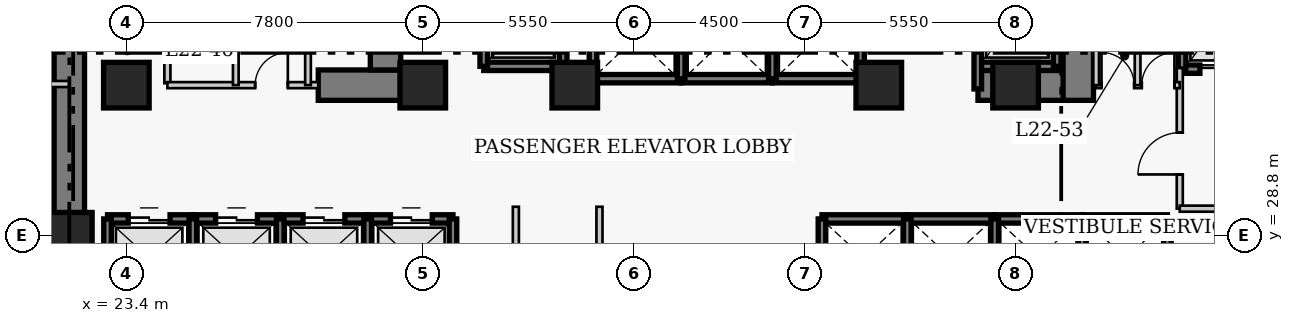
"""IFC4 building model, lengths in metres.
Left out: names, types, materials, properties, quantities, classifications, styles, units other than length and angle.
Written with IfcOpenShell. Run it as: python <this file> out.ifc"""

import sys

from ifc_helpers import new_model, si_unit, direction, frame, frame_2d, origin, origin_2d, place, context, subcontext, project, spatial, rectangle, extrude, element, fill, save


model = new_model("IFC4")
c1 = context("Model", 3, precision=1e-05, world=origin(), true_north=direction((0.0, 1.0)))
c2 = subcontext(c1, "Body", "Model", "MODEL_VIEW")
j1 = project(units=[si_unit("LENGTHUNIT", "METRE"), si_unit("PLANEANGLEUNIT", "RADIAN")], contexts=[c1])
p1 = place(None, origin())
s1 = spatial("IfcSite", under=j1, at=p1, CompositionType="ELEMENT")
p2 = place(p1, origin())
s2 = spatial("IfcBuilding", under=s1, at=p2, CompositionType="ELEMENT")
p3 = place(p2, frame((0.0, 0.0, 91.8)))
s3 = spatial("IfcBuildingStorey", under=s2, at=p3, CompositionType="ELEMENT", Elevation=91.8)
p4 = place(p3, frame((21.9, 27.05, 0.0), z_axis=(0.0, 0.0, 1.0), x_axis=(0.0, 1.0, 0.0)))
e1 = element("IfcWall", 1, at=p4, inside=s3, PredefinedType="SHEAR", context=c2, shape_type="SweptSolid", body=[
    extrude(rectangle(XDim=13.67, YDim=0.8, at=frame_2d((6.835, 0.0))), origin(), (0.0, 0.0, 1.0), 3.8),
])
p5 = place(p3, frame((28.45, 32.75, 0.0), z_axis=(0.0, 0.0, 1.0), x_axis=(1.0, 0.0, 0.0)))
e2 = element("IfcWall", 2, at=p5, inside=s3, PredefinedType="SHEAR", context=c2, shape_type="SweptSolid", body=[
    extrude(rectangle(XDim=2.4, YDim=0.8, at=frame_2d((1.2, 0.0))), origin(), (0.0, 0.0, 1.0), 3.8),
])
p6 = place(p3, frame((45.81, 32.75, 0.0), z_axis=(0.0, 0.0, 1.0), x_axis=(1.0, 0.0, 0.0)))
e3 = element("IfcWall", 3, at=p6, inside=s3, PredefinedType="SHEAR", context=c2, shape_type="SweptSolid", body=[
    extrude(rectangle(XDim=2.64, YDim=0.8, at=frame_2d((1.32, 0.0))), origin(), (0.0, 0.0, 1.0), 3.8),
])
p7 = place(p3, frame((30.22, 33.15, 0.0), z_axis=(0.0, 0.0, 1.0), x_axis=(0.0, 1.0, 0.0)))
e4 = element("IfcWall", 4, at=p7, inside=s3, PredefinedType="SHEAR", context=c2, shape_type="SweptSolid", body=[
    extrude(rectangle(XDim=7.17, YDim=0.8, at=frame_2d((3.585, 0.0))), origin(), (0.0, 0.0, 1.0), 3.8),
])
p8 = place(p3, frame((48.45, 32.35, 0.0), z_axis=(0.0, 0.0, 1.0), x_axis=(0.0, 1.0, 0.0)))
e5 = element("IfcWall", 5, at=p8, inside=s3, PredefinedType="SHEAR", context=c2, shape_type="SweptSolid", body=[
    extrude(rectangle(XDim=7.97, YDim=0.8, at=frame_2d((3.985, 0.0))), origin(), (0.0, 0.0, 1.0), 3.8),
])
p9 = place(p8, frame((5.85, 0.0, 0.0)))
e6 = element("IfcOpeningElement", 6, at=p9, cuts=e5, PredefinedType="OPENING", context=c2, shape_type="SweptSolid", body=[
    extrude(rectangle(XDim=1.1, YDim=2.15, at=frame_2d((0.55, 1.075))), frame((0.0, 0.41, 0.0), z_axis=(0.0, -1.0, 0.0), x_axis=(1.0, 0.0, 0.0)), (0.0, 0.0, 1.0), 0.82),
])
for number, where, z_axis, x_axis in (
    (7, (21.9, 28.8, 0.0), (0.0, 0.0, 1.0), (1.0, 0.0, 0.0)),
    (8, (23.4, 32.75, 0.0), (0.0, 0.0, 1.0), (1.0, 0.0, 0.0)),
    (9, (31.2, 32.75, 0.0), (0.0, 0.0, 1.0), (1.0, 0.0, 0.0)),
    (10, (35.2, 32.75, 0.0), (0.0, 0.0, 1.0), (1.0, 0.0, 0.0)),
    (11, (43.2, 32.75, 0.0), (0.0, 0.0, 1.0), (1.0, 0.0, 0.0)),
    (12, (46.8, 32.75, 0.0), (0.0, 0.0, 1.0), (1.0, 0.0, 0.0)),
):
    element("IfcColumn", number, at=place(p3, frame(where, z_axis=z_axis, x_axis=x_axis)), inside=s3, PredefinedType="COLUMN", context=c2, shape_type="SweptSolid", body=[
        extrude(rectangle(XDim=1.2, YDim=1.2, at=origin_2d()), origin(), (0.0, 0.0, 1.0), 3.8),
    ])
p10 = place(p3, frame((22.905, 29.23, 0.0), z_axis=(0.0, 0.0, 1.0), x_axis=(1.0, 0.0, 0.0)))
e13 = element("IfcWall", 13, at=p10, inside=s3, PredefinedType="SHEAR", context=c2, shape_type="SweptSolid", body=[
    extrude(rectangle(XDim=2.245, YDim=0.22, at=frame_2d((1.123, 0.0))), origin(), (0.0, 0.0, 1.0), 3.8),
])
p11 = place(p10, frame((0.545, 0.0, 0.0)))
e14 = element("IfcOpeningElement", 14, at=p11, cuts=e13, PredefinedType="OPENING", context=c2, shape_type="SweptSolid", body=[
    extrude(rectangle(XDim=1.1, YDim=2.15, at=frame_2d((0.55, 1.075))), frame((0.0, 0.12, 0.0), z_axis=(0.0, -1.0, 0.0), x_axis=(1.0, 0.0, 0.0)), (0.0, 0.0, 1.0), 0.24),
])
p12 = place(p3, frame((22.905, 27.17, 0.0), z_axis=(0.0, 0.0, 1.0), x_axis=(0.0, 1.0, 0.0)))
e15 = element("IfcWall", 15, at=p12, inside=s3, PredefinedType="SHEAR", context=c2, shape_type="SweptSolid", body=[
    extrude(rectangle(XDim=2.06, YDim=0.2, at=frame_2d((1.03, 0.0))), origin(), (0.0, 0.0, 1.0), 3.8),
])
p13 = place(p3, frame((25.15, 29.23, 0.0), z_axis=(0.0, 0.0, 1.0), x_axis=(1.0, 0.0, 0.0)))
e16 = element("IfcWall", 16, at=p13, inside=s3, PredefinedType="SHEAR", context=c2, shape_type="SweptSolid", body=[
    extrude(rectangle(XDim=2.3, YDim=0.22, at=frame_2d((1.15, 0.0))), origin(), (0.0, 0.0, 1.0), 3.8),
])
p14 = place(p13, frame((0.6, 0.0, 0.0)))
e17 = element("IfcOpeningElement", 17, at=p14, cuts=e16, PredefinedType="OPENING", context=c2, shape_type="SweptSolid", body=[
    extrude(rectangle(XDim=1.1, YDim=2.15, at=frame_2d((0.55, 1.075))), frame((0.0, 0.12, 0.0), z_axis=(0.0, -1.0, 0.0), x_axis=(1.0, 0.0, 0.0)), (0.0, 0.0, 1.0), 0.24),
])
p15 = place(p3, frame((25.15, 27.17, 0.0), z_axis=(0.0, 0.0, 1.0), x_axis=(0.0, 1.0, 0.0)))
e18 = element("IfcWall", 18, at=p15, inside=s3, PredefinedType="SHEAR", context=c2, shape_type="SweptSolid", body=[
    extrude(rectangle(XDim=2.06, YDim=0.2, at=frame_2d((1.03, 0.0))), origin(), (0.0, 0.0, 1.0), 3.8),
])
p16 = place(p3, frame((27.45, 29.23, 0.0), z_axis=(0.0, 0.0, 1.0), x_axis=(1.0, 0.0, 0.0)))
e19 = element("IfcWall", 19, at=p16, inside=s3, PredefinedType="SHEAR", context=c2, shape_type="SweptSolid", body=[
    extrude(rectangle(XDim=2.3, YDim=0.22, at=frame_2d((1.15, 0.0))), origin(), (0.0, 0.0, 1.0), 3.8),
])
p17 = place(p16, frame((0.6, 0.0, 0.0)))
e20 = element("IfcOpeningElement", 20, at=p17, cuts=e19, PredefinedType="OPENING", context=c2, shape_type="SweptSolid", body=[
    extrude(rectangle(XDim=1.1, YDim=2.15, at=frame_2d((0.55, 1.075))), frame((0.0, 0.12, 0.0), z_axis=(0.0, -1.0, 0.0), x_axis=(1.0, 0.0, 0.0)), (0.0, 0.0, 1.0), 0.24),
])
p18 = place(p3, frame((27.45, 27.17, 0.0), z_axis=(0.0, 0.0, 1.0), x_axis=(0.0, 1.0, 0.0)))
e21 = element("IfcWall", 21, at=p18, inside=s3, PredefinedType="SHEAR", context=c2, shape_type="SweptSolid", body=[
    extrude(rectangle(XDim=2.06, YDim=0.2, at=frame_2d((1.03, 0.0))), origin(), (0.0, 0.0, 1.0), 3.8),
])
p19 = place(p3, frame((29.75, 29.23, 0.0), z_axis=(0.0, 0.0, 1.0), x_axis=(1.0, 0.0, 0.0)))
e22 = element("IfcWall", 22, at=p19, inside=s3, PredefinedType="SHEAR", context=c2, shape_type="SweptSolid", body=[
    extrude(rectangle(XDim=2.245, YDim=0.22, at=frame_2d((1.123, 0.0))), origin(), (0.0, 0.0, 1.0), 3.8),
])
p20 = place(p19, frame((0.6, 0.0, 0.0)))
e23 = element("IfcOpeningElement", 23, at=p20, cuts=e22, PredefinedType="OPENING", context=c2, shape_type="SweptSolid", body=[
    extrude(rectangle(XDim=1.1, YDim=2.15, at=frame_2d((0.55, 1.075))), frame((0.0, 0.12, 0.0), z_axis=(0.0, -1.0, 0.0), x_axis=(1.0, 0.0, 0.0)), (0.0, 0.0, 1.0), 0.24),
])
for number, where, z_axis, x_axis in (
    (24, (29.75, 27.17, 0.0), (0.0, 0.0, 1.0), (0.0, 1.0, 0.0)),
    (25, (31.995, 27.17, 0.0), (0.0, 0.0, 1.0), (0.0, 1.0, 0.0)),
):
    element("IfcWall", number, at=place(p3, frame(where, z_axis=z_axis, x_axis=x_axis)), inside=s3, PredefinedType="SHEAR", context=c2, shape_type="SweptSolid", body=[
        extrude(rectangle(XDim=2.06, YDim=0.2, at=frame_2d((1.03, 0.0))), origin(), (0.0, 0.0, 1.0), 3.8),
    ])
p21 = place(p3, frame((41.705, 29.23, 0.0), z_axis=(0.0, 0.0, 1.0), x_axis=(1.0, 0.0, 0.0)))
e26 = element("IfcWall", 26, at=p21, inside=s3, PredefinedType="SHEAR", context=c2, shape_type="SweptSolid", body=[
    extrude(rectangle(XDim=2.245, YDim=0.22, at=frame_2d((1.123, 0.0))), origin(), (0.0, 0.0, 1.0), 3.8),
])
p22 = place(p3, frame((41.705, 27.17, 0.0), z_axis=(0.0, 0.0, 1.0), x_axis=(0.0, 1.0, 0.0)))
e27 = element("IfcWall", 27, at=p22, inside=s3, PredefinedType="SHEAR", context=c2, shape_type="SweptSolid", body=[
    extrude(rectangle(XDim=2.06, YDim=0.2, at=frame_2d((1.03, 0.0))), origin(), (0.0, 0.0, 1.0), 3.8),
])
p23 = place(p3, frame((43.95, 29.23, 0.0), z_axis=(0.0, 0.0, 1.0), x_axis=(1.0, 0.0, 0.0)))
e28 = element("IfcWall", 28, at=p23, inside=s3, PredefinedType="SHEAR", context=c2, shape_type="SweptSolid", body=[
    extrude(rectangle(XDim=2.3, YDim=0.22, at=frame_2d((1.15, 0.0))), origin(), (0.0, 0.0, 1.0), 3.8),
])
p24 = place(p3, frame((43.95, 27.17, 0.0), z_axis=(0.0, 0.0, 1.0), x_axis=(0.0, 1.0, 0.0)))
e29 = element("IfcWall", 29, at=p24, inside=s3, PredefinedType="SHEAR", context=c2, shape_type="SweptSolid", body=[
    extrude(rectangle(XDim=2.06, YDim=0.2, at=frame_2d((1.03, 0.0))), origin(), (0.0, 0.0, 1.0), 3.8),
])
p25 = place(p3, frame((46.25, 29.23, 0.0), z_axis=(0.0, 0.0, 1.0), x_axis=(1.0, 0.0, 0.0)))
e30 = element("IfcWall", 30, at=p25, inside=s3, PredefinedType="SHEAR", context=c2, shape_type="SweptSolid", body=[
    extrude(rectangle(XDim=2.3, YDim=0.22, at=frame_2d((1.15, 0.0))), origin(), (0.0, 0.0, 1.0), 3.8),
])
p26 = place(p3, frame((46.25, 27.17, 0.0), z_axis=(0.0, 0.0, 1.0), x_axis=(0.0, 1.0, 0.0)))
e31 = element("IfcWall", 31, at=p26, inside=s3, PredefinedType="SHEAR", context=c2, shape_type="SweptSolid", body=[
    extrude(rectangle(XDim=2.06, YDim=0.2, at=frame_2d((1.03, 0.0))), origin(), (0.0, 0.0, 1.0), 3.8),
])
p27 = place(p3, frame((48.55, 29.23, 0.0), z_axis=(0.0, 0.0, 1.0), x_axis=(1.0, 0.0, 0.0)))
e32 = element("IfcWall", 32, at=p27, inside=s3, PredefinedType="SHEAR", context=c2, shape_type="SweptSolid", body=[
    extrude(rectangle(XDim=2.245, YDim=0.22, at=frame_2d((1.123, 0.0))), origin(), (0.0, 0.0, 1.0), 3.8),
])
for number, where, z_axis, x_axis in (
    (33, (48.55, 27.17, 0.0), (0.0, 0.0, 1.0), (0.0, 1.0, 0.0)),
    (34, (50.795, 27.17, 0.0), (0.0, 0.0, 1.0), (0.0, 1.0, 0.0)),
):
    element("IfcWall", number, at=place(p3, frame(where, z_axis=z_axis, x_axis=x_axis)), inside=s3, PredefinedType="SHEAR", context=c2, shape_type="SweptSolid", body=[
        extrude(rectangle(XDim=2.06, YDim=0.2, at=frame_2d((1.03, 0.0))), origin(), (0.0, 0.0, 1.0), 3.8),
    ])
p28 = place(p3, frame((35.68, 32.92, 0.0), z_axis=(0.0, 0.0, 1.0), x_axis=(1.0, 0.0, 0.0)))
e35 = element("IfcWall", 35, at=p28, inside=s3, PredefinedType="SHEAR", context=c2, shape_type="SweptSolid", body=[
    extrude(rectangle(XDim=2.32, YDim=0.22, at=frame_2d((1.16, 0.0))), origin(), (0.0, 0.0, 1.0), 3.8),
])
p29 = place(p3, frame((35.68, 32.92, 0.0), z_axis=(0.0, 0.0, 1.0), x_axis=(0.0, 1.0, 0.0)))
e36 = element("IfcWall", 36, at=p29, inside=s3, PredefinedType="SHEAR", context=c2, shape_type="SweptSolid", body=[
    extrude(rectangle(XDim=2.16, YDim=0.2, at=frame_2d((1.08, 0.0))), origin(), (0.0, 0.0, 1.0), 3.8),
])
p30 = place(p3, frame((38.0, 32.92, 0.0), z_axis=(0.0, 0.0, 1.0), x_axis=(1.0, 0.0, 0.0)))
e37 = element("IfcWall", 37, at=p30, inside=s3, PredefinedType="SHEAR", context=c2, shape_type="SweptSolid", body=[
    extrude(rectangle(XDim=2.4, YDim=0.22, at=frame_2d((1.2, 0.0))), origin(), (0.0, 0.0, 1.0), 3.8),
])
p31 = place(p3, frame((38.0, 32.92, 0.0), z_axis=(0.0, 0.0, 1.0), x_axis=(0.0, 1.0, 0.0)))
e38 = element("IfcWall", 38, at=p31, inside=s3, PredefinedType="SHEAR", context=c2, shape_type="SweptSolid", body=[
    extrude(rectangle(XDim=2.16, YDim=0.2, at=frame_2d((1.08, 0.0))), origin(), (0.0, 0.0, 1.0), 3.8),
])
p32 = place(p3, frame((40.4, 32.92, 0.0), z_axis=(0.0, 0.0, 1.0), x_axis=(1.0, 0.0, 0.0)))
e39 = element("IfcWall", 39, at=p32, inside=s3, PredefinedType="SHEAR", context=c2, shape_type="SweptSolid", body=[
    extrude(rectangle(XDim=2.32, YDim=0.22, at=frame_2d((1.16, 0.0))), origin(), (0.0, 0.0, 1.0), 3.8),
])
for number, where, z_axis, x_axis in (
    (40, (40.4, 32.92, 0.0), (0.0, 0.0, 1.0), (0.0, 1.0, 0.0)),
    (41, (42.72, 32.92, 0.0), (0.0, 0.0, 1.0), (0.0, 1.0, 0.0)),
):
    element("IfcWall", number, at=place(p3, frame(where, z_axis=z_axis, x_axis=x_axis)), inside=s3, PredefinedType="SHEAR", context=c2, shape_type="SweptSolid", body=[
        extrude(rectangle(XDim=2.16, YDim=0.2, at=frame_2d((1.08, 0.0))), origin(), (0.0, 0.0, 1.0), 3.8),
    ])
p33 = place(p3, frame((51.18, 33.17, 0.0), z_axis=(0.0, 0.0, 1.0), x_axis=(1.0, 0.0, 0.0)))
e42 = element("IfcWall", 42, at=p33, inside=s3, PredefinedType="SHEAR", context=c2, shape_type="SweptSolid", body=[
    extrude(rectangle(XDim=2.42, YDim=0.22, at=frame_2d((1.21, 0.0))), origin(), (0.0, 0.0, 1.0), 3.8),
])
p34 = place(p33, frame((0.47, 0.0, 0.0)))
e43 = element("IfcOpeningElement", 43, at=p34, cuts=e42, PredefinedType="OPENING", context=c2, shape_type="SweptSolid", body=[
    extrude(rectangle(XDim=1.3, YDim=2.15, at=frame_2d((0.65, 1.075))), frame((0.0, 0.12, 0.0), z_axis=(0.0, -1.0, 0.0), x_axis=(1.0, 0.0, 0.0)), (0.0, 0.0, 1.0), 0.24),
])
p35 = place(p3, frame((51.18, 33.17, 0.0), z_axis=(0.0, 0.0, 1.0), x_axis=(0.0, 1.0, 0.0)))
e44 = element("IfcWall", 44, at=p35, inside=s3, PredefinedType="SHEAR", context=c2, shape_type="SweptSolid", body=[
    extrude(rectangle(XDim=2.86, YDim=0.2, at=frame_2d((1.43, 0.0))), origin(), (0.0, 0.0, 1.0), 3.8),
])
p36 = place(p3, frame((32.805, 33.245, 0.0), z_axis=(0.0, 0.0, 1.0), x_axis=(1.0, 0.0, 0.0)))
e45 = element("IfcWall", 45, at=p36, inside=s3, PredefinedType="SHEAR", context=c2, shape_type="SweptSolid", body=[
    extrude(rectangle(XDim=2.09, YDim=0.22, at=frame_2d((1.045, 0.0))), origin(), (0.0, 0.0, 1.0), 3.8),
])
for number, where, z_axis, x_axis in (
    (46, (32.805, 33.245, 0.0), (0.0, 0.0, 1.0), (0.0, 1.0, 0.0)),
    (47, (34.895, 33.245, 0.0), (0.0, 0.0, 1.0), (0.0, 1.0, 0.0)),
):
    element("IfcWall", number, at=place(p3, frame(where, z_axis=z_axis, x_axis=x_axis)), inside=s3, PredefinedType="SHEAR", context=c2, shape_type="SweptSolid", body=[
        extrude(rectangle(XDim=2.91, YDim=0.2, at=frame_2d((1.455, 0.0))), origin(), (0.0, 0.0, 1.0), 3.8),
    ])
p37 = place(p3, frame((45.805, 33.245, 0.0), z_axis=(0.0, 0.0, 1.0), x_axis=(1.0, 0.0, 0.0)))
e48 = element("IfcWall", 48, at=p37, inside=s3, PredefinedType="SHEAR", context=c2, shape_type="SweptSolid", body=[
    extrude(rectangle(XDim=2.09, YDim=0.22, at=frame_2d((1.045, 0.0))), origin(), (0.0, 0.0, 1.0), 3.8),
])
p38 = place(p3, frame((45.805, 32.65, 0.0), z_axis=(0.0, 0.0, 1.0), x_axis=(0.0, 1.0, 0.0)))
e49 = element("IfcWall", 49, at=p38, inside=s3, PredefinedType="SHEAR", context=c2, shape_type="SweptSolid", body=[
    extrude(rectangle(XDim=3.505, YDim=0.2, at=frame_2d((1.752, 0.0))), origin(), (0.0, 0.0, 1.0), 3.8),
])
p39 = place(p3, frame((47.895, 33.245, 0.0), z_axis=(0.0, 0.0, 1.0), x_axis=(0.0, 1.0, 0.0)))
e50 = element("IfcWall", 50, at=p39, inside=s3, PredefinedType="SHEAR", context=c2, shape_type="SweptSolid", body=[
    extrude(rectangle(XDim=2.91, YDim=0.2, at=frame_2d((1.455, 0.0))), origin(), (0.0, 0.0, 1.0), 3.8),
])
p40 = place(p3, frame((24.48, 32.8, 0.0), z_axis=(0.0, 0.0, 1.0), x_axis=(0.0, 1.0, 0.0)))
e51 = element("IfcWall", 51, at=p40, inside=s3, PredefinedType="PARTITIONING", context=c2, shape_type="SweptSolid", body=[
    extrude(rectangle(XDim=3.57, YDim=0.16, at=frame_2d((1.785, 0.0))), origin(), (0.0, 0.0, 1.0), 3.54),
])
p41 = place(p40, frame((1.604, 0.0, 0.0)))
e52 = element("IfcOpeningElement", 52, at=p41, cuts=e51, PredefinedType="OPENING", context=c2, shape_type="SweptSolid", body=[
    extrude(rectangle(XDim=0.9, YDim=2.1, at=frame_2d((0.45, 1.05))), frame((0.0, 0.09, 0.0), z_axis=(0.0, -1.0, 0.0), x_axis=(1.0, 0.0, 0.0)), (0.0, 0.0, 1.0), 0.18),
])
p42 = place(p3, frame((51.12, 29.5, 0.0), z_axis=(0.0, 0.0, 1.0), x_axis=(0.0, 1.0, 0.0)))
e53 = element("IfcWall", 53, at=p42, inside=s3, PredefinedType="PARTITIONING", context=c2, shape_type="SweptSolid", body=[
    extrude(rectangle(XDim=3.7, YDim=0.16, at=frame_2d((1.85, 0.0))), origin(), (0.0, 0.0, 1.0), 3.54),
])
p43 = place(p42, frame((0.9, 0.0, 0.0)))
e54 = element("IfcOpeningElement", 54, at=p43, cuts=e53, PredefinedType="OPENING", context=c2, shape_type="SweptSolid", body=[
    extrude(rectangle(XDim=1.1, YDim=2.15, at=frame_2d((0.55, 1.075))), frame((0.0, 0.09, 0.0), z_axis=(0.0, -1.0, 0.0), x_axis=(1.0, 0.0, 0.0)), (0.0, 0.0, 1.0), 0.18),
])
p44 = place(p3, frame((51.12, 29.5, 0.0), z_axis=(0.0, 0.0, 1.0), x_axis=(1.0, 0.0, 0.0)))
e55 = element("IfcWall", 55, at=p44, inside=s3, PredefinedType="PARTITIONING", context=c2, shape_type="SweptSolid", body=[
    extrude(rectangle(XDim=5.63, YDim=0.16, at=frame_2d((2.815, 0.0))), origin(), (0.0, 0.0, 1.0), 3.54),
])
p45 = place(p3, frame((24.48, 32.75, 0.0), z_axis=(0.0, 0.0, 1.0), x_axis=(1.0, 0.0, 0.0)))
e56 = element("IfcWall", 56, at=p45, inside=s3, PredefinedType="PARTITIONING", context=c2, shape_type="SweptSolid", body=[
    extrude(rectangle(XDim=3.97, YDim=0.16, at=frame_2d((1.985, 0.0))), origin(), (0.0, 0.0, 1.0), 3.54),
])
p46 = place(p45, frame((2.31, 0.0, 0.0)))
e57 = element("IfcOpeningElement", 57, at=p46, cuts=e56, PredefinedType="OPENING", context=c2, shape_type="SweptSolid", body=[
    extrude(rectangle(XDim=0.86, YDim=2.05, at=frame_2d((0.43, 1.025))), frame((0.0, 0.09, 0.0), z_axis=(0.0, -1.0, 0.0), x_axis=(1.0, 0.0, 0.0)), (0.0, 0.0, 1.0), 0.18),
])
p47 = place(p3, frame((48.92, 32.75, 0.0), z_axis=(0.0, 0.0, 1.0), x_axis=(1.0, 0.0, 0.0)))
e58 = element("IfcWall", 58, at=p47, inside=s3, PredefinedType="PARTITIONING", context=c2, shape_type="SweptSolid", body=[
    extrude(rectangle(XDim=2.2, YDim=0.16, at=frame_2d((1.1, 0.0))), origin(), (0.0, 0.0, 1.0), 3.54),
])
p48 = place(p47, frame((0.14, 0.0, 0.0)))
e59 = element("IfcOpeningElement", 59, at=p48, cuts=e58, PredefinedType="OPENING", context=c2, shape_type="SweptSolid", body=[
    extrude(rectangle(XDim=0.86, YDim=2.05, at=frame_2d((0.43, 1.025))), frame((0.0, 0.09, 0.0), z_axis=(0.0, -1.0, 0.0), x_axis=(1.0, 0.0, 0.0)), (0.0, 0.0, 1.0), 0.18),
])
p49 = place(p47, frame((1.2, 0.0, 0.0)))
e60 = element("IfcOpeningElement", 60, at=p49, cuts=e58, PredefinedType="OPENING", context=c2, shape_type="SweptSolid", body=[
    extrude(rectangle(XDim=0.86, YDim=2.05, at=frame_2d((0.43, 1.025))), frame((0.0, 0.09, 0.0), z_axis=(0.0, -1.0, 0.0), x_axis=(1.0, 0.0, 0.0)), (0.0, 0.0, 1.0), 0.18),
])
for number, where, z_axis, x_axis in (
    (61, (48.92, 32.75, 0.0), (0.0, 0.0, 1.0), (0.0, 1.0, 0.0)),
    (62, (26.28, 32.75, 0.0), (0.0, 0.0, 1.0), (0.0, 1.0, 0.0)),
    (63, (28.18, 32.75, 0.0), (0.0, 0.0, 1.0), (0.0, 1.0, 0.0)),
    (64, (50.01, 32.75, 0.0), (0.0, 0.0, 1.0), (0.0, 1.0, 0.0)),
):
    element("IfcWall", number, at=place(p3, frame(where, z_axis=z_axis, x_axis=x_axis)), inside=s3, PredefinedType="PARTITIONING", context=c2, shape_type="SweptSolid", body=[
        extrude(rectangle(XDim=3.62, YDim=0.15, at=frame_2d((1.81, 0.0))), origin(), (0.0, 0.0, 1.0), 3.54),
    ])
for number, where, z_axis, x_axis in (
    (65, (33.65, 24.91, 0.0), (0.0, 0.0, 1.0), (0.0, 1.0, 0.0)),
    (66, (35.85, 24.91, 0.0), (0.0, 0.0, 1.0), (0.0, 1.0, 0.0)),
):
    element("IfcWall", number, at=place(p3, frame(where, z_axis=z_axis, x_axis=x_axis)), inside=s3, PredefinedType="PARTITIONING", context=c2, shape_type="SweptSolid", body=[
        extrude(rectangle(XDim=4.64, YDim=0.16, at=frame_2d((2.32, 0.0))), origin(), (0.0, 0.0, 1.0), 3.54),
    ])
p50 = place(p3, frame((19.16, 32.78, 0.0), z_axis=(0.0, 0.0, 1.0), x_axis=(1.0, 0.0, 0.0)))
e67 = element("IfcWall", 67, at=p50, inside=s3, PredefinedType="PARTITIONING", context=c2, shape_type="SweptSolid", body=[
    extrude(rectangle(XDim=2.74, YDim=0.16, at=frame_2d((1.37, 0.0))), origin(), (0.0, 0.0, 1.0), 3.54),
])
p51 = place(p11, origin())
e68 = element("IfcDoor", 68, at=p51, inside=s3, OperationType="DOUBLE_DOOR_SLIDING", PredefinedType="DOOR", context=c2, shape_type="SweptSolid", body=[
    extrude(rectangle(XDim=1.1, YDim=2.15, at=frame_2d((0.55, 1.075))), frame((0.0, 0.025, 0.0), z_axis=(0.0, -1.0, 0.0), x_axis=(1.0, 0.0, 0.0)), (0.0, 0.0, 1.0), 0.05),
])
fill(e14, e68)
p52 = place(p14, origin())
e69 = element("IfcDoor", 69, at=p52, inside=s3, OperationType="DOUBLE_DOOR_SLIDING", PredefinedType="DOOR", context=c2, shape_type="SweptSolid", body=[
    extrude(rectangle(XDim=1.1, YDim=2.15, at=frame_2d((0.55, 1.075))), frame((0.0, 0.025, 0.0), z_axis=(0.0, -1.0, 0.0), x_axis=(1.0, 0.0, 0.0)), (0.0, 0.0, 1.0), 0.05),
])
fill(e17, e69)
p53 = place(p17, origin())
e70 = element("IfcDoor", 70, at=p53, inside=s3, OperationType="DOUBLE_DOOR_SLIDING", PredefinedType="DOOR", context=c2, shape_type="SweptSolid", body=[
    extrude(rectangle(XDim=1.1, YDim=2.15, at=frame_2d((0.55, 1.075))), frame((0.0, 0.025, 0.0), z_axis=(0.0, -1.0, 0.0), x_axis=(1.0, 0.0, 0.0)), (0.0, 0.0, 1.0), 0.05),
])
fill(e20, e70)
p54 = place(p20, origin())
e71 = element("IfcDoor", 71, at=p54, inside=s3, OperationType="DOUBLE_DOOR_SLIDING", PredefinedType="DOOR", context=c2, shape_type="SweptSolid", body=[
    extrude(rectangle(XDim=1.1, YDim=2.15, at=frame_2d((0.55, 1.075))), frame((0.0, 0.025, 0.0), z_axis=(0.0, -1.0, 0.0), x_axis=(1.0, 0.0, 0.0)), (0.0, 0.0, 1.0), 0.05),
])
fill(e23, e71)
p55 = place(p34, origin())
e72 = element("IfcDoor", 72, at=p55, inside=s3, OperationType="DOUBLE_DOOR_SLIDING", PredefinedType="DOOR", context=c2, shape_type="SweptSolid", body=[
    extrude(rectangle(XDim=1.3, YDim=2.15, at=frame_2d((0.65, 1.075))), frame((0.0, 0.025, 0.0), z_axis=(0.0, -1.0, 0.0), x_axis=(1.0, 0.0, 0.0)), (0.0, 0.0, 1.0), 0.05),
])
fill(e43, e72)
p56 = place(p43, origin())
e73 = element("IfcDoor", 73, at=p56, inside=s3, OperationType="SINGLE_SWING_LEFT", PredefinedType="DOOR", context=c2, shape_type="SweptSolid", body=[
    extrude(rectangle(XDim=1.1, YDim=2.15, at=frame_2d((0.55, 1.075))), frame((0.0, 0.025, 0.0), z_axis=(0.0, -1.0, 0.0), x_axis=(1.0, 0.0, 0.0)), (0.0, 0.0, 1.0), 0.05),
])
fill(e54, e73)
p57 = place(p46, origin())
e74 = element("IfcDoor", 74, at=p57, inside=s3, OperationType="SINGLE_SWING_RIGHT", PredefinedType="DOOR", context=c2, shape_type="SweptSolid", body=[
    extrude(rectangle(XDim=0.86, YDim=2.05, at=frame_2d((0.43, 1.025))), frame((0.0, 0.025, 0.0), z_axis=(0.0, -1.0, 0.0), x_axis=(1.0, 0.0, 0.0)), (0.0, 0.0, 1.0), 0.05),
])
fill(e57, e74)
p58 = place(p48, origin())
e75 = element("IfcDoor", 75, at=p58, inside=s3, OperationType="SINGLE_SWING_LEFT", PredefinedType="DOOR", context=c2, shape_type="SweptSolid", body=[
    extrude(rectangle(XDim=0.86, YDim=2.05, at=frame_2d((0.43, 1.025))), frame((0.0, 0.025, 0.0), z_axis=(0.0, -1.0, 0.0), x_axis=(1.0, 0.0, 0.0)), (0.0, 0.0, 1.0), 0.05),
])
fill(e59, e75)
p59 = place(p49, origin())
e76 = element("IfcDoor", 76, at=p59, inside=s3, OperationType="SINGLE_SWING_RIGHT", PredefinedType="DOOR", context=c2, shape_type="SweptSolid", body=[
    extrude(rectangle(XDim=0.86, YDim=2.05, at=frame_2d((0.43, 1.025))), frame((0.0, 0.025, 0.0), z_axis=(0.0, -1.0, 0.0), x_axis=(1.0, 0.0, 0.0)), (0.0, 0.0, 1.0), 0.05),
])
fill(e60, e76)
save(model, sys.argv[1])
